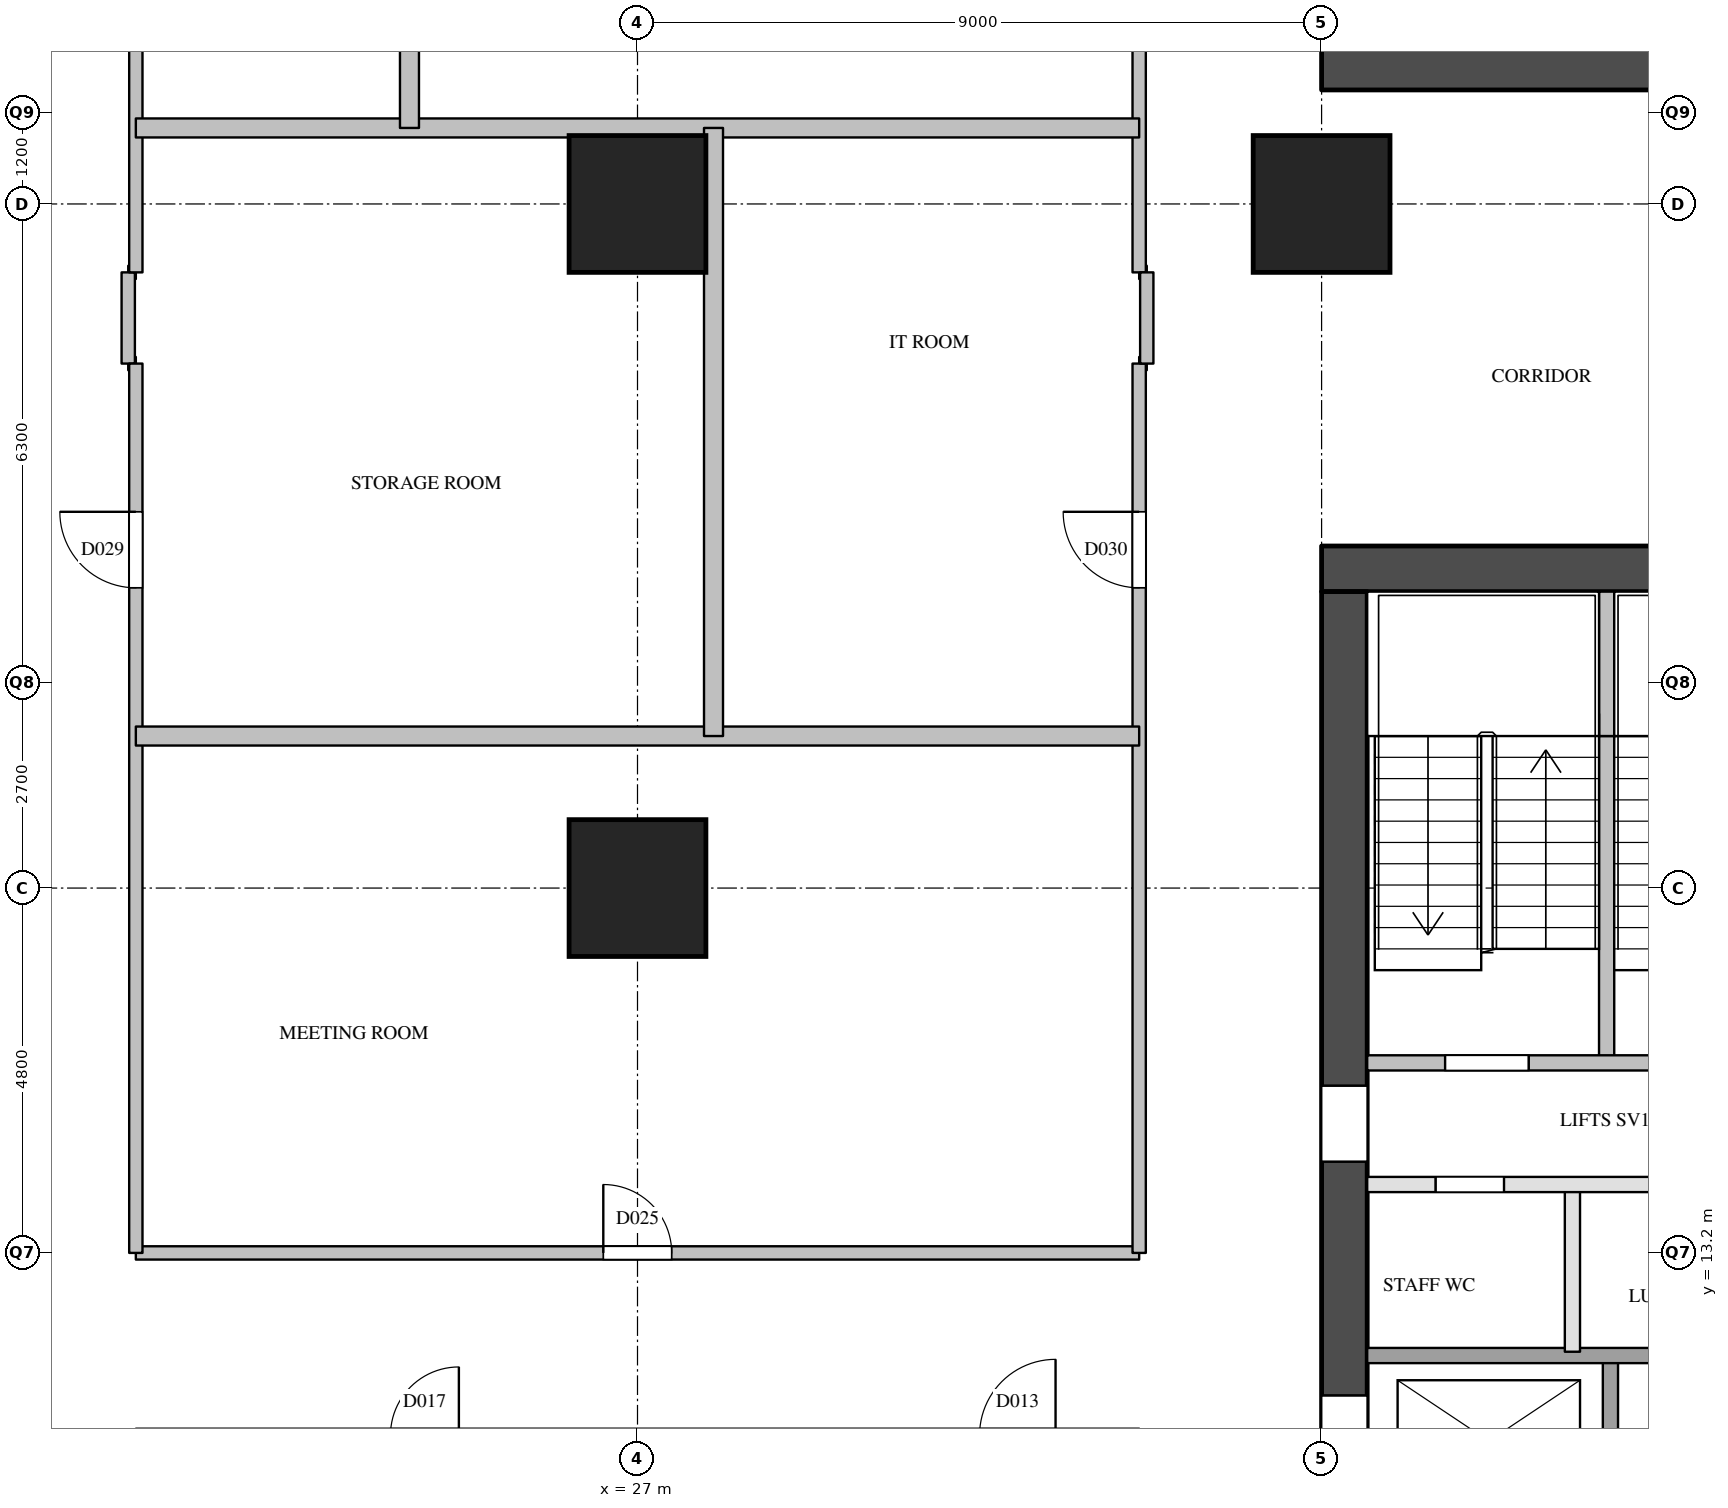
"""IFC4 building model, lengths in metres.
Left out: names, types, materials, properties, quantities, classifications, styles, units other than length and angle.
Written with IfcOpenShell. Run it as: python <this file> out.ifc"""

import sys

from ifc_helpers import new_model, si_unit, direction, frame, frame_2d, origin, origin_2d, place, context, subcontext, project, spatial, rectangle, extrude, element, fill, save


model = new_model("IFC4")
c1 = context("Model", 3, precision=1e-05, world=origin(), true_north=direction((0.0, 1.0)))
c2 = subcontext(c1, "Body", "Model", "MODEL_VIEW")
j1 = project(units=[si_unit("LENGTHUNIT", "METRE"), si_unit("PLANEANGLEUNIT", "RADIAN")], contexts=[c1])
p1 = place(None, origin())
s1 = spatial("IfcSite", under=j1, at=p1, CompositionType="ELEMENT")
p2 = place(p1, origin())
s2 = spatial("IfcBuilding", under=s1, at=p2, CompositionType="ELEMENT")
p3 = place(p2, frame((0.0, 0.0, 38.6)))
s3 = spatial("IfcBuildingStorey", under=s2, at=p3, CompositionType="ELEMENT", Elevation=38.6)
for number, where, z_axis, x_axis in (
    (1, (27.0, 18.0, 0.0), (0.0, 0.0, 1.0), (1.0, 0.0, 0.0)),
    (2, (27.0, 27.0, 0.0), (0.0, 0.0, 1.0), (1.0, 0.0, 0.0)),
    (3, (36.0, 27.0, 0.0), (0.0, 0.0, 1.0), (1.0, 0.0, 0.0)),
):
    element("IfcColumn", number, at=place(p3, frame(where, z_axis=z_axis, x_axis=x_axis)), inside=s3, PredefinedType="COLUMN", context=c2, shape_type="SweptSolid", body=[
        extrude(rectangle(XDim=1.8, YDim=1.8, at=origin_2d()), origin(), (0.0, 0.0, 1.0), 3.8),
    ])
p4 = place(p3, frame((36.0, 28.8, 0.0), z_axis=(0.0, 0.0, 1.0), x_axis=(1.0, 0.0, 0.0)))
e4 = element("IfcWall", 4, at=p4, inside=s3, PredefinedType="SHEAR", context=c2, shape_type="SweptSolid", body=[
    extrude(rectangle(XDim=12.4, YDim=0.6, at=frame_2d((6.2, 0.0))), origin(), (0.0, 0.0, 1.0), 3.5),
])
p5 = place(p3, frame((36.0, 22.2, 0.0), z_axis=(0.0, 0.0, 1.0), x_axis=(1.0, 0.0, 0.0)))
e5 = element("IfcWall", 5, at=p5, inside=s3, PredefinedType="SHEAR", context=c2, shape_type="SweptSolid", body=[
    extrude(rectangle(XDim=9.0, YDim=0.6, at=frame_2d((4.5, 0.0))), origin(), (0.0, 0.0, 1.0), 3.5),
])
p6 = place(p3, frame((36.3, 9.6, 0.0), z_axis=(0.0, 0.0, 1.0), x_axis=(0.0, 1.0, 0.0)))
e6 = element("IfcWall", 6, at=p6, inside=s3, PredefinedType="SHEAR", context=c2, shape_type="SweptSolid", body=[
    extrude(rectangle(XDim=12.3, YDim=0.6, at=frame_2d((6.15, 0.0))), origin(), (0.0, 0.0, 1.0), 3.5),
])
p7 = place(p6, frame((0.525, 0.0, 0.0)))
e7 = element("IfcOpeningElement", 7, at=p7, cuts=e6, PredefinedType="OPENING", context=c2, shape_type="SweptSolid", body=[
    extrude(rectangle(XDim=1.2, YDim=2.1, at=frame_2d((0.6, 1.05))), frame((0.0, 0.31, 0.0), z_axis=(0.0, -1.0, 0.0), x_axis=(1.0, 0.0, 0.0)), (0.0, 0.0, 1.0), 0.62),
])
p8 = place(p6, frame((4.8, 0.0, 0.0)))
e8 = element("IfcOpeningElement", 8, at=p8, cuts=e6, PredefinedType="OPENING", context=c2, shape_type="SweptSolid", body=[
    extrude(rectangle(XDim=1.0, YDim=2.1, at=frame_2d((0.5, 1.05))), frame((0.0, 0.31, 0.0), z_axis=(0.0, -1.0, 0.0), x_axis=(1.0, 0.0, 0.0)), (0.0, 0.0, 1.0), 0.62),
])
p9 = place(p3, frame((39.3, 11.9, 0.0), z_axis=(0.0, 0.0, 1.0), x_axis=(0.0, 1.0, 0.0)))
e9 = element("IfcWall", 9, at=p9, inside=s3, PredefinedType="PARTITIONING", context=c2, shape_type="SweptSolid", body=[
    extrude(rectangle(XDim=2.2, YDim=0.2, at=frame_2d((1.1, 0.0))), origin(), (0.0, 0.0, 1.0), 3.5),
])
p10 = place(p3, frame((39.75, 15.7, 0.0), z_axis=(0.0, 0.0, 1.0), x_axis=(0.0, 1.0, 0.0)))
e10 = element("IfcWall", 10, at=p10, inside=s3, PredefinedType="SOLIDWALL", context=c2, shape_type="SweptSolid", body=[
    extrude(rectangle(XDim=4.3, YDim=0.2, at=frame_2d((2.15, 0.0))), origin(), (0.0, 0.0, 1.0), 3.5),
])
p11 = place(p3, frame((39.75, 20.0, 0.0), z_axis=(0.0, 0.0, 1.0), x_axis=(0.0, 1.0, 0.0)))
e11 = element("IfcWall", 11, at=p11, inside=s3, PredefinedType="SOLIDWALL", context=c2, shape_type="SweptSolid", body=[
    extrude(rectangle(XDim=1.9, YDim=0.2, at=frame_2d((0.95, 0.0))), origin(), (0.0, 0.0, 1.0), 3.5),
])
p12 = place(p3, frame((39.8, 9.6, 0.0), z_axis=(0.0, 0.0, 1.0), x_axis=(0.0, 1.0, 0.0)))
e12 = element("IfcWall", 12, at=p12, inside=s3, PredefinedType="SOLIDWALL", context=c2, shape_type="SweptSolid", body=[
    extrude(rectangle(XDim=2.3, YDim=0.2, at=frame_2d((1.15, 0.0))), origin(), (0.0, 0.0, 1.0), 3.5),
])
p13 = place(p3, frame((36.6, 11.85, 0.0), z_axis=(0.0, 0.0, 1.0), x_axis=(1.0, 0.0, 0.0)))
e13 = element("IfcWall", 13, at=p13, inside=s3, PredefinedType="SOLIDWALL", context=c2, shape_type="SweptSolid", body=[
    extrude(rectangle(XDim=7.8, YDim=0.2, at=frame_2d((3.9, 0.0))), origin(), (0.0, 0.0, 1.0), 3.5),
])
p14 = place(p3, frame((36.6, 14.1, 0.0), z_axis=(0.0, 0.0, 1.0), x_axis=(1.0, 0.0, 0.0)))
e14 = element("IfcWall", 14, at=p14, inside=s3, PredefinedType="PARTITIONING", context=c2, shape_type="SweptSolid", body=[
    extrude(rectangle(XDim=6.0, YDim=0.2, at=frame_2d((3.0, 0.0))), origin(), (0.0, 0.0, 1.0), 3.5),
])
p15 = place(p14, frame((0.9, 0.0, 0.0)))
e15 = element("IfcOpeningElement", 15, at=p15, cuts=e14, PredefinedType="OPENING", context=c2, shape_type="SweptSolid", body=[
    extrude(rectangle(XDim=0.9, YDim=2.1, at=frame_2d((0.45, 1.05))), frame((0.0, 0.11, 0.0), z_axis=(0.0, -1.0, 0.0), x_axis=(1.0, 0.0, 0.0)), (0.0, 0.0, 1.0), 0.22),
])
p16 = place(p14, frame((3.9, 0.0, 0.0)))
e16 = element("IfcOpeningElement", 16, at=p16, cuts=e14, PredefinedType="OPENING", context=c2, shape_type="SweptSolid", body=[
    extrude(rectangle(XDim=0.9, YDim=2.1, at=frame_2d((0.45, 1.05))), frame((0.0, 0.11, 0.0), z_axis=(0.0, -1.0, 0.0), x_axis=(1.0, 0.0, 0.0)), (0.0, 0.0, 1.0), 0.22),
])
p17 = place(p3, frame((36.6, 15.7, 0.0), z_axis=(0.0, 0.0, 1.0), x_axis=(1.0, 0.0, 0.0)))
e17 = element("IfcWall", 17, at=p17, inside=s3, PredefinedType="SOLIDWALL", context=c2, shape_type="SweptSolid", body=[
    extrude(rectangle(XDim=6.3, YDim=0.2, at=frame_2d((3.15, 0.0))), origin(), (0.0, 0.0, 1.0), 3.5),
])
p18 = place(p17, frame((1.025, 0.0, 0.0)))
e18 = element("IfcOpeningElement", 18, at=p18, cuts=e17, PredefinedType="OPENING", context=c2, shape_type="SweptSolid", body=[
    extrude(rectangle(XDim=1.1, YDim=2.1, at=frame_2d((0.55, 1.05))), frame((0.0, 0.11, 0.0), z_axis=(0.0, -1.0, 0.0), x_axis=(1.0, 0.0, 0.0)), (0.0, 0.0, 1.0), 0.22),
])
p19 = place(p17, frame((4.175, 0.0, 0.0)))
e19 = element("IfcOpeningElement", 19, at=p19, cuts=e17, PredefinedType="OPENING", context=c2, shape_type="SweptSolid", body=[
    extrude(rectangle(XDim=1.1, YDim=2.1, at=frame_2d((0.55, 1.05))), frame((0.0, 0.11, 0.0), z_axis=(0.0, -1.0, 0.0), x_axis=(1.0, 0.0, 0.0)), (0.0, 0.0, 1.0), 0.22),
])
p20 = place(p3, frame((20.4, 13.2, 0.0), z_axis=(0.0, 0.0, 1.0), x_axis=(1.0, 0.0, 0.0)))
e20 = element("IfcWall", 20, at=p20, inside=s3, PredefinedType="PARTITIONING", context=c2, shape_type="SweptSolid", body=[
    extrude(rectangle(XDim=13.2, YDim=0.175, at=frame_2d((6.6, 0.0))), origin(), (0.0, 0.0, 1.0), 2.5),
])
p21 = place(p20, frame((6.15, 0.0, 0.0)))
e21 = element("IfcOpeningElement", 21, at=p21, cuts=e20, PredefinedType="OPENING", context=c2, shape_type="SweptSolid", body=[
    extrude(rectangle(XDim=0.9, YDim=2.1, at=frame_2d((0.45, 1.05))), frame((0.0, 0.097, 0.0), z_axis=(0.0, -1.0, 0.0), x_axis=(1.0, 0.0, 0.0)), (0.0, 0.0, 1.0), 0.195),
])
for number, where, z_axis, x_axis in (
    (22, (20.3, 24.9, 0.0), (0.0, 0.0, 1.0), (1.0, 0.0, 0.0)),
    (23, (33.6, 24.9, 0.0), (0.0, 0.0, 1.0), (1.0, 0.0, 0.0)),
    (24, (20.3, 26.1, 0.0), (0.0, 0.0, 1.0), (1.0, 0.0, 0.0)),
    (25, (33.6, 26.1, 0.0), (0.0, 0.0, 1.0), (1.0, 0.0, 0.0)),
):
    element("IfcWall", number, at=place(p3, frame(where, z_axis=z_axis, x_axis=x_axis)), inside=s3, PredefinedType="PARTITIONING", context=c2, shape_type="SweptSolid", body=[
        extrude(rectangle(XDim=0.1, YDim=0.175, at=frame_2d((0.05, 0.0))), origin(), (0.0, 0.0, 1.0), 3.5),
    ])
p22 = place(p3, frame((20.3, 24.9, 0.0), z_axis=(0.0, 0.0, 1.0), x_axis=(0.0, 1.0, 0.0)))
e26 = element("IfcWall", 26, at=p22, inside=s3, PredefinedType="PARTITIONING", context=c2, shape_type="SweptSolid", body=[
    extrude(rectangle(XDim=1.2, YDim=0.175, at=frame_2d((0.6, 0.0))), origin(), (0.0, 0.0, 1.0), 3.5),
])
p23 = place(p3, frame((20.4, 13.2, 0.0), z_axis=(0.0, 0.0, 1.0), x_axis=(0.0, 1.0, 0.0)))
e27 = element("IfcWall", 27, at=p23, inside=s3, PredefinedType="PARTITIONING", context=c2, shape_type="SweptSolid", body=[
    extrude(rectangle(XDim=11.7, YDim=0.175, at=frame_2d((5.85, 0.0))), origin(), (0.0, 0.0, 1.0), 3.5),
])
p24 = place(p23, frame((8.75, 0.0, 0.0)))
e28 = element("IfcOpeningElement", 28, at=p24, cuts=e27, PredefinedType="OPENING", context=c2, shape_type="SweptSolid", body=[
    extrude(rectangle(XDim=1.0, YDim=2.1, at=frame_2d((0.5, 1.05))), frame((0.0, 0.097, 0.0), z_axis=(0.0, -1.0, 0.0), x_axis=(1.0, 0.0, 0.0)), (0.0, 0.0, 1.0), 0.195),
])
p25 = place(p3, frame((20.4, 26.1, 0.0), z_axis=(0.0, 0.0, 1.0), x_axis=(0.0, 1.0, 0.0)))
e29 = element("IfcWall", 29, at=p25, inside=s3, PredefinedType="PARTITIONING", context=c2, shape_type="SweptSolid", body=[
    extrude(rectangle(XDim=11.25, YDim=0.175, at=frame_2d((5.625, 0.0))), origin(), (0.0, 0.0, 1.0), 2.5),
])
p26 = place(p25, frame((6.075, 0.0, 0.0)))
e30 = element("IfcOpeningElement", 30, at=p26, cuts=e29, PredefinedType="OPENING", context=c2, shape_type="SweptSolid", body=[
    extrude(rectangle(XDim=1.0, YDim=2.1, at=frame_2d((0.5, 1.05))), frame((0.0, 0.097, 0.0), z_axis=(0.0, -1.0, 0.0), x_axis=(1.0, 0.0, 0.0)), (0.0, 0.0, 1.0), 0.195),
])
p27 = place(p3, frame((33.6, 13.2, 0.0), z_axis=(0.0, 0.0, 1.0), x_axis=(0.0, 1.0, 0.0)))
e31 = element("IfcWall", 31, at=p27, inside=s3, PredefinedType="PARTITIONING", context=c2, shape_type="SweptSolid", body=[
    extrude(rectangle(XDim=11.7, YDim=0.175, at=frame_2d((5.85, 0.0))), origin(), (0.0, 0.0, 1.0), 3.5),
])
p28 = place(p27, frame((8.75, 0.0, 0.0)))
e32 = element("IfcOpeningElement", 32, at=p28, cuts=e31, PredefinedType="OPENING", context=c2, shape_type="SweptSolid", body=[
    extrude(rectangle(XDim=1.0, YDim=2.1, at=frame_2d((0.5, 1.05))), frame((0.0, 0.097, 0.0), z_axis=(0.0, -1.0, 0.0), x_axis=(1.0, 0.0, 0.0)), (0.0, 0.0, 1.0), 0.195),
])
p29 = place(p3, frame((33.6, 26.1, 0.0), z_axis=(0.0, 0.0, 1.0), x_axis=(0.0, 1.0, 0.0)))
e33 = element("IfcWall", 33, at=p29, inside=s3, PredefinedType="PARTITIONING", context=c2, shape_type="SweptSolid", body=[
    extrude(rectangle(XDim=11.25, YDim=0.175, at=frame_2d((5.625, 0.0))), origin(), (0.0, 0.0, 1.0), 2.5),
])
p30 = place(p3, frame((33.7, 24.9, 0.0), z_axis=(0.0, 0.0, 1.0), x_axis=(0.0, 1.0, 0.0)))
e34 = element("IfcWall", 34, at=p30, inside=s3, PredefinedType="PARTITIONING", context=c2, shape_type="SweptSolid", body=[
    extrude(rectangle(XDim=1.2, YDim=0.175, at=frame_2d((0.6, 0.0))), origin(), (0.0, 0.0, 1.0), 3.5),
])
for number, where, z_axis, x_axis in (
    (35, (20.4, 20.0, 0.0), (0.0, 0.0, 1.0), (1.0, 0.0, 0.0)),
    (36, (20.4, 28.0, 0.0), (0.0, 0.0, 1.0), (1.0, 0.0, 0.0)),
):
    element("IfcWall", number, at=place(p3, frame(where, z_axis=z_axis, x_axis=x_axis)), inside=s3, PredefinedType="PARTITIONING", context=c2, shape_type="SweptSolid", body=[
        extrude(rectangle(XDim=13.2, YDim=0.25, at=frame_2d((6.6, 0.0))), origin(), (0.0, 0.0, 1.0), 2.5),
    ])
p31 = place(p3, frame((24.0, 28.0, 0.0), z_axis=(0.0, 0.0, 1.0), x_axis=(0.0, 1.0, 0.0)))
e37 = element("IfcWall", 37, at=p31, inside=s3, PredefinedType="PARTITIONING", context=c2, shape_type="SweptSolid", body=[
    extrude(rectangle(XDim=9.35, YDim=0.25, at=frame_2d((4.675, 0.0))), origin(), (0.0, 0.0, 1.0), 3.5),
])
p32 = place(p3, frame((28.0, 20.0, 0.0), z_axis=(0.0, 0.0, 1.0), x_axis=(0.0, 1.0, 0.0)))
e38 = element("IfcWall", 38, at=p32, inside=s3, PredefinedType="PARTITIONING", context=c2, shape_type="SweptSolid", body=[
    extrude(rectangle(XDim=8.0, YDim=0.25, at=frame_2d((4.0, 0.0))), origin(), (0.0, 0.0, 1.0), 2.5),
])
p33 = place(p7, origin())
e39 = element("IfcDoor", 39, at=p33, inside=s3, OperationType="SLIDING_TO_LEFT", PredefinedType="DOOR", context=c2, shape_type="SweptSolid", body=[
    extrude(rectangle(XDim=1.2, YDim=2.1, at=frame_2d((0.6, 1.05))), frame((0.0, 0.025, 0.0), z_axis=(0.0, -1.0, 0.0), x_axis=(1.0, 0.0, 0.0)), (0.0, 0.0, 1.0), 0.05),
])
fill(e7, e39)
p34 = place(p18, origin())
e40 = element("IfcDoor", 40, at=p34, inside=s3, OperationType="SINGLE_SWING_LEFT", PredefinedType="DOOR", context=c2, shape_type="SweptSolid", body=[
    extrude(rectangle(XDim=1.1, YDim=2.1, at=frame_2d((0.55, 1.05))), frame((0.0, 0.025, 0.0), z_axis=(0.0, -1.0, 0.0), x_axis=(1.0, 0.0, 0.0)), (0.0, 0.0, 1.0), 0.05),
])
fill(e18, e40)
p35 = place(p8, origin())
e41 = element("IfcDoor", 41, at=p35, inside=s3, OperationType="SINGLE_SWING_LEFT", PredefinedType="DOOR", context=c2, shape_type="SweptSolid", body=[
    extrude(rectangle(XDim=1.0, YDim=2.1, at=frame_2d((0.5, 1.05))), frame((0.0, 0.025, 0.0), z_axis=(0.0, -1.0, 0.0), x_axis=(1.0, 0.0, 0.0)), (0.0, 0.0, 1.0), 0.05),
])
fill(e8, e41)
p36 = place(p15, origin())
e42 = element("IfcDoor", 42, at=p36, inside=s3, OperationType="SINGLE_SWING_LEFT", PredefinedType="DOOR", context=c2, shape_type="SweptSolid", body=[
    extrude(rectangle(XDim=0.9, YDim=2.1, at=frame_2d((0.45, 1.05))), frame((0.0, 0.025, 0.0), z_axis=(0.0, -1.0, 0.0), x_axis=(1.0, 0.0, 0.0)), (0.0, 0.0, 1.0), 0.05),
])
fill(e15, e42)
p37 = place(p21, origin())
e43 = element("IfcDoor", 43, at=p37, inside=s3, OperationType="SINGLE_SWING_LEFT", PredefinedType="DOOR", context=c2, shape_type="SweptSolid", body=[
    extrude(rectangle(XDim=0.9, YDim=2.1, at=frame_2d((0.45, 1.05))), frame((0.0, 0.025, 0.0), z_axis=(0.0, -1.0, 0.0), x_axis=(1.0, 0.0, 0.0)), (0.0, 0.0, 1.0), 0.05),
])
fill(e21, e43)
p38 = place(p24, origin())
e44 = element("IfcDoor", 44, at=p38, inside=s3, OperationType="SINGLE_SWING_RIGHT", PredefinedType="DOOR", context=c2, shape_type="SweptSolid", body=[
    extrude(rectangle(XDim=1.0, YDim=2.1, at=frame_2d((0.5, 1.05))), frame((0.0, 0.025, 0.0), z_axis=(0.0, -1.0, 0.0), x_axis=(1.0, 0.0, 0.0)), (0.0, 0.0, 1.0), 0.05),
])
fill(e28, e44)
p39 = place(p28, origin())
e45 = element("IfcDoor", 45, at=p39, inside=s3, OperationType="SINGLE_SWING_RIGHT", PredefinedType="DOOR", context=c2, shape_type="SweptSolid", body=[
    extrude(rectangle(XDim=1.0, YDim=2.1, at=frame_2d((0.5, 1.05))), frame((0.0, 0.025, 0.0), z_axis=(0.0, -1.0, 0.0), x_axis=(1.0, 0.0, 0.0)), (0.0, 0.0, 1.0), 0.05),
])
fill(e32, e45)
save(model, sys.argv[1])
